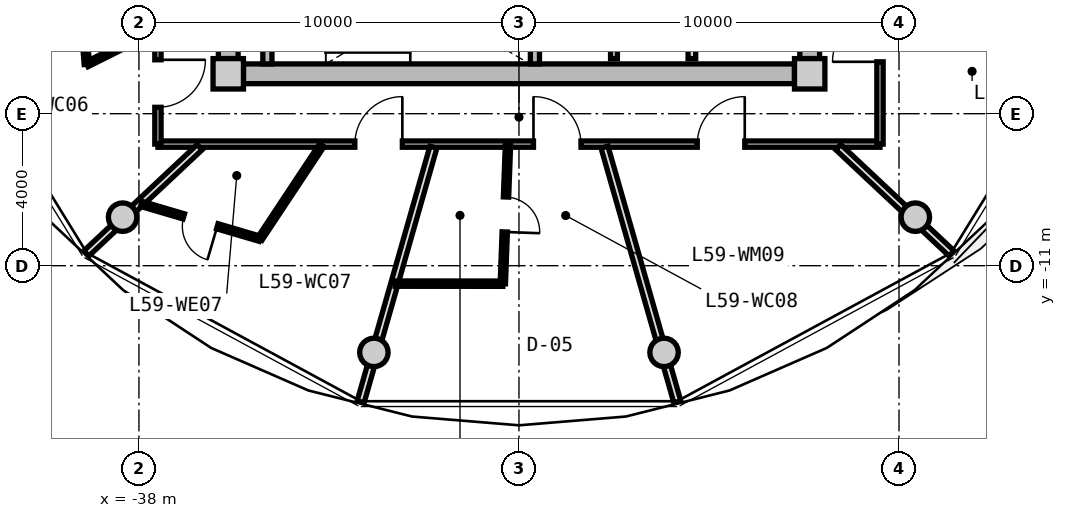
"""IFC4 building model, lengths in metres.
Left out: names, types, materials, properties, quantities, classifications, styles, units other than length and angle.
Written with IfcOpenShell. Run it as: python <this file> out.ifc"""

import sys

from ifc_helpers import new_model, si_unit, direction, frame, frame_2d, origin, origin_2d, place, context, subcontext, project, spatial, rectangle, circle, extrude, source, transform, mapped, element, fill, save


model = new_model("IFC4")
c1 = context("Model", 3, precision=1e-05, world=origin(), true_north=direction((0.0, 1.0)))
c2 = subcontext(c1, "Body", "Model", "MODEL_VIEW")
j1 = project(units=[si_unit("LENGTHUNIT", "METRE"), si_unit("PLANEANGLEUNIT", "RADIAN")], contexts=[c1])
p1 = place(None, origin())
s1 = spatial("IfcSite", under=j1, at=p1, CompositionType="ELEMENT")
p2 = place(p1, origin())
s2 = spatial("IfcBuilding", under=s1, at=p2, CompositionType="ELEMENT")
p3 = place(p2, frame((0.0, 0.0, 190.65)))
s3 = spatial("IfcBuildingStorey", under=s2, at=p3, CompositionType="ELEMENT", Elevation=190.65)
m1 = source(origin(), c2, "Body", "SweptSolid", [
    extrude(rectangle(XDim=0.8, YDim=0.8, at=origin_2d()), origin(), (0.0, 0.0, 1.0), 3.05),
])
for number, where, z_axis, x_axis in (
    (1, (-35.65, -5.95, 0.0), (0.0, 0.0, 1.0), (1.0, 0.0, 0.0)),
    (2, (-20.35, -5.95, 0.0), (0.0, 0.0, 1.0), (1.0, 0.0, 0.0)),
):
    element("IfcColumn", number, at=place(p3, frame(where, z_axis=z_axis, x_axis=x_axis)), inside=s3, PredefinedType="COLUMN", context=c2, shape_type="MappedRepresentation", body=[
        mapped(m1, transform((0.0, 0.0, 0.0), x_axis=(1.0, 0.0, 0.0), y_axis=(0.0, 1.0, 0.0), z_axis=(0.0, 0.0, 1.0), scale=1.0)),
    ])
m2 = source(origin(), c2, "Body", "SweptSolid", [
    extrude(rectangle(XDim=14.5, YDim=0.52, at=frame_2d((7.25, 0.0))), origin(), (0.0, 0.0, 1.0), 2.81),
])
p4 = place(p3, frame((-20.75, -5.95, 0.0), z_axis=(0.0, 0.0, 1.0), x_axis=(-1.0, 0.0, 0.0)))
e3 = element("IfcWall", 3, at=p4, inside=s3, PredefinedType="SHEAR", context=c2, shape_type="MappedRepresentation", body=[
    mapped(m2, transform((0.0, 0.0, 0.0), x_axis=(1.0, 0.0, 0.0), y_axis=(0.0, 1.0, 0.0), z_axis=(0.0, 0.0, 1.0), scale=1.0)),
])
m3 = source(origin(), c2, "Body", "SweptSolid", [
    extrude(rectangle(XDim=11.1, YDim=0.52, at=frame_2d((5.55, 0.0))), origin(), (0.0, 0.0, 1.0), 2.81),
])
p5 = place(p3, frame((-35.65, -5.55, 0.0), z_axis=(0.0, 0.0, 1.0), x_axis=(0.0, 1.0, 0.0)))
e4 = element("IfcWall", 4, at=p5, inside=s3, PredefinedType="SHEAR", context=c2, shape_type="MappedRepresentation", body=[
    mapped(m3, transform((0.0, 0.0, 0.0), x_axis=(1.0, 0.0, 0.0), y_axis=(0.0, 1.0, 0.0), z_axis=(0.0, 0.0, 1.0), scale=1.0)),
])
p6 = place(p5, frame((3.8, 0.0, 0.0)))
e5 = element("IfcOpeningElement", 5, at=p6, cuts=e4, PredefinedType="OPENING", context=c2, shape_type="SweptSolid", body=[
    extrude(rectangle(XDim=1.2, YDim=2.15, at=frame_2d((0.6, 1.075))), frame((0.0, 0.27, 0.0), z_axis=(0.0, -1.0, 0.0), x_axis=(1.0, 0.0, 0.0)), (0.0, 0.0, 1.0), 0.54),
])
p7 = place(p3, frame((-20.35, 5.55, 0.0), z_axis=(0.0, 0.0, 1.0), x_axis=(0.0, -1.0, 0.0)))
e6 = element("IfcWall", 6, at=p7, inside=s3, PredefinedType="SHEAR", context=c2, shape_type="MappedRepresentation", body=[
    mapped(m3, transform((0.0, 0.0, 0.0), x_axis=(1.0, 0.0, 0.0), y_axis=(0.0, 1.0, 0.0), z_axis=(0.0, 0.0, 1.0), scale=1.0)),
])
p8 = place(p7, frame((5.65, 0.0, 0.0)))
e7 = element("IfcOpeningElement", 7, at=p8, cuts=e6, PredefinedType="OPENING", context=c2, shape_type="SweptSolid", body=[
    extrude(rectangle(XDim=1.2, YDim=2.15, at=frame_2d((0.6, 1.075))), frame((0.0, 0.27, 0.0), z_axis=(0.0, -1.0, 0.0), x_axis=(1.0, 0.0, 0.0)), (0.0, 0.0, 1.0), 0.54),
])
p9 = place(p7, frame((9.3, 0.0, 0.0)))
e8 = element("IfcOpeningElement", 8, at=p9, cuts=e6, PredefinedType="OPENING", context=c2, shape_type="SweptSolid", body=[
    extrude(rectangle(XDim=1.0, YDim=2.1, at=frame_2d((0.5, 1.05))), frame((0.0, 0.27, 0.0), z_axis=(0.0, -1.0, 0.0), x_axis=(1.0, 0.0, 0.0)), (0.0, 0.0, 1.0), 0.54),
])
m4 = source(origin(), c2, "Body", "SweptSolid", [
    extrude(circle(Radius=0.375, at=origin_2d()), origin(), (0.0, 0.0, 1.0), 3.47),
])
for number, where, z_axis, x_axis in (
    (9, (-38.43, -9.723, -0.42), (0.0, 0.0, 1.0), (1.0, 0.0, 0.0)),
    (10, (-31.818, -13.281, -0.42), (0.0, 0.0, 1.0), (1.0, 0.0, 0.0)),
    (11, (-24.182, -13.281, -0.42), (0.0, 0.0, 1.0), (1.0, 0.0, 0.0)),
    (12, (-17.57, -9.723, -0.42), (0.0, 0.0, 1.0), (1.0, 0.0, 0.0)),
):
    element("IfcColumn", number, at=place(p3, frame(where, z_axis=z_axis, x_axis=x_axis)), inside=s3, PredefinedType="COLUMN", context=c2, shape_type="MappedRepresentation", body=[
        mapped(m4, transform((0.0, 0.0, 0.0), x_axis=(1.0, 0.0, 0.0), y_axis=(0.0, 1.0, 0.0), z_axis=(0.0, 0.0, 1.0), scale=1.0)),
    ])
m5 = source(origin(), c2, "Body", "SweptSolid", [
    extrude(rectangle(XDim=3.24, YDim=0.24, at=frame_2d((1.62, 0.0))), origin(), (0.0, 0.0, 1.0), 2.81),
])
for number, where, z_axis, x_axis in (
    (13, (-34.62, -5.69, 0.0), (0.0, 0.0, 1.0), (0.0, 1.0, 0.0)),
    (14, (-27.58, -5.69, 0.0), (0.0, 0.0, 1.0), (0.0, 1.0, 0.0)),
):
    element("IfcWall", number, at=place(p3, frame(where, z_axis=z_axis, x_axis=x_axis)), inside=s3, PredefinedType="PARTITIONING", context=c2, shape_type="MappedRepresentation", body=[
        mapped(m5, transform((0.0, 0.0, 0.0), x_axis=(1.0, 0.0, 0.0), y_axis=(0.0, 1.0, 0.0), z_axis=(0.0, 0.0, 1.0), scale=1.0)),
    ])
m6 = source(origin(), c2, "Body", "SweptSolid", [
    extrude(rectangle(XDim=3.8, YDim=0.2, at=frame_2d((1.9, 0.0))), origin(), (0.0, 0.0, 1.0), 2.795),
])
p10 = place(p3, frame((-23.45, -5.55, 0.0), z_axis=(0.0, 0.0, 1.0), x_axis=(0.0, 1.0, 0.0)))
e15 = element("IfcWall", 15, at=p10, inside=s3, PredefinedType="PARTITIONING", context=c2, shape_type="MappedRepresentation", body=[
    mapped(m6, transform((0.0, 0.0, 0.0), x_axis=(1.0, 0.0, 0.0), y_axis=(0.0, 1.0, 0.0), z_axis=(0.0, 0.0, 1.0), scale=1.0)),
])
m7 = source(origin(), c2, "Body", "SweptSolid", [
    extrude(rectangle(XDim=4.2, YDim=0.18, at=frame_2d((2.1, 0.0))), origin(), (0.0, 0.0, 1.0), 2.795),
])
p11 = place(p3, frame((-25.5, -5.55, 0.0), z_axis=(0.0, 0.0, 1.0), x_axis=(0.0, 1.0, 0.0)))
e16 = element("IfcWall", 16, at=p11, inside=s3, PredefinedType="PARTITIONING", context=c2, shape_type="MappedRepresentation", body=[
    mapped(m7, transform((0.0, 0.0, 0.0), x_axis=(1.0, 0.0, 0.0), y_axis=(0.0, 1.0, 0.0), z_axis=(0.0, 0.0, 1.0), scale=1.0)),
])
m8 = source(origin(), c2, "Body", "SweptSolid", [
    extrude(rectangle(XDim=19.0, YDim=0.165, at=frame_2d((9.5, 0.0))), origin(), (0.0, 0.0, 1.0), 2.795),
])
p12 = place(p3, frame((-18.5, -7.8, 0.0), z_axis=(0.0, 0.0, 1.0), x_axis=(-1.0, 0.0, 0.0)))
e17 = element("IfcWall", 17, at=p12, inside=s3, PredefinedType="PARTITIONING", context=c2, shape_type="MappedRepresentation", body=[
    mapped(m8, transform((0.0, 0.0, 0.0), x_axis=(1.0, 0.0, 0.0), y_axis=(0.0, 1.0, 0.0), z_axis=(0.0, 0.0, 1.0), scale=1.0)),
])
p13 = place(p12, frame((12.569, 0.0, 0.0)))
e18 = element("IfcOpeningElement", 18, at=p13, cuts=e17, PredefinedType="OPENING", context=c2, shape_type="SweptSolid", body=[
    extrude(rectangle(XDim=1.25, YDim=2.2, at=frame_2d((0.625, 1.1))), frame((0.0, 0.093, 0.0), z_axis=(0.0, -1.0, 0.0), x_axis=(1.0, 0.0, 0.0)), (0.0, 0.0, 1.0), 0.185),
])
p14 = place(p12, frame((7.868, 0.0, 0.0)))
e19 = element("IfcOpeningElement", 19, at=p14, cuts=e17, PredefinedType="OPENING", context=c2, shape_type="SweptSolid", body=[
    extrude(rectangle(XDim=1.25, YDim=2.2, at=frame_2d((0.625, 1.1))), frame((0.0, 0.093, 0.0), z_axis=(0.0, -1.0, 0.0), x_axis=(1.0, 0.0, 0.0)), (0.0, 0.0, 1.0), 0.185),
])
p15 = place(p12, frame((3.559, 0.0, 0.0)))
e20 = element("IfcOpeningElement", 20, at=p15, cuts=e17, PredefinedType="OPENING", context=c2, shape_type="SweptSolid", body=[
    extrude(rectangle(XDim=1.25, YDim=2.2, at=frame_2d((0.625, 1.1))), frame((0.0, 0.093, 0.0), z_axis=(0.0, -1.0, 0.0), x_axis=(1.0, 0.0, 0.0)), (0.0, 0.0, 1.0), 0.185),
])
m9 = source(origin(), c2, "Body", "SweptSolid", [
    extrude(rectangle(XDim=6.88, YDim=0.165, at=frame_2d((3.44, 0.0))), origin(), (0.0, 0.0, 1.0), 2.795),
])
p16 = place(p3, frame((-37.5, -7.8, 0.0), z_axis=(0.0, 0.0, 1.0), x_axis=(0.0, 1.0, 0.0)))
e21 = element("IfcWall", 21, at=p16, inside=s3, PredefinedType="PARTITIONING", context=c2, shape_type="MappedRepresentation", body=[
    mapped(m9, transform((0.0, 0.0, 0.0), x_axis=(1.0, 0.0, 0.0), y_axis=(0.0, 1.0, 0.0), z_axis=(0.0, 0.0, 1.0), scale=1.0)),
])
p17 = place(p16, frame((0.968, 0.0, 0.0)))
e22 = element("IfcOpeningElement", 22, at=p17, cuts=e21, PredefinedType="OPENING", context=c2, shape_type="SweptSolid", body=[
    extrude(rectangle(XDim=1.25, YDim=2.2, at=frame_2d((0.625, 1.1))), frame((0.0, 0.093, 0.0), z_axis=(0.0, -1.0, 0.0), x_axis=(1.0, 0.0, 0.0)), (0.0, 0.0, 1.0), 0.185),
])
p18 = place(p3, frame((-18.5, -0.92, 0.0), z_axis=(0.0, 0.0, 1.0), x_axis=(0.0, -1.0, 0.0)))
e23 = element("IfcWall", 23, at=p18, inside=s3, PredefinedType="PARTITIONING", context=c2, shape_type="MappedRepresentation", body=[
    mapped(m9, transform((0.0, 0.0, 0.0), x_axis=(1.0, 0.0, 0.0), y_axis=(0.0, 1.0, 0.0), z_axis=(0.0, 0.0, 1.0), scale=1.0)),
])
p19 = place(p18, frame((3.464, 0.0, 0.0)))
e24 = element("IfcOpeningElement", 24, at=p19, cuts=e23, PredefinedType="OPENING", context=c2, shape_type="SweptSolid", body=[
    extrude(rectangle(XDim=1.25, YDim=2.2, at=frame_2d((0.625, 1.1))), frame((0.0, 0.093, 0.0), z_axis=(0.0, -1.0, 0.0), x_axis=(1.0, 0.0, 0.0)), (0.0, 0.0, 1.0), 0.185),
])
m10 = source(origin(), c2, "Body", "SweptSolid", [
    extrude(rectangle(XDim=4.089, YDim=0.19, at=frame_2d((2.044, 0.0))), origin(), (0.0, 0.0, 1.0), 2.395),
])
p20 = place(p3, frame((-36.402, -7.88, 0.0), z_axis=(0.0, 0.0, 1.0), x_axis=(-0.729401273609, -0.684086092577, 0.0)))
e25 = element("IfcWall", 25, at=p20, inside=s3, PredefinedType="PARTITIONING", context=c2, shape_type="MappedRepresentation", body=[
    mapped(m10, transform((0.0, 0.0, 0.0), x_axis=(1.0, 0.0, 0.0), y_axis=(0.0, 1.0, 0.0), z_axis=(0.0, 0.0, 1.0), scale=1.0)),
])
m11 = source(origin(), c2, "Body", "SweptSolid", [
    extrude(rectangle(XDim=2.06, YDim=0.14, at=frame_2d((1.03, 0.0))), origin(), (0.0, 0.0, 1.0), 2.795),
])
p21 = place(p3, frame((-37.53, -4.778, 0.0), z_axis=(0.0, 0.0, 1.0), x_axis=(-0.893952568722, -0.448161583444, 0.0)))
e26 = element("IfcWall", 26, at=p21, inside=s3, PredefinedType="PARTITIONING", context=c2, shape_type="MappedRepresentation", body=[
    mapped(m11, transform((0.0, 0.0, 0.0), x_axis=(1.0, 0.0, 0.0), y_axis=(0.0, 1.0, 0.0), z_axis=(0.0, 0.0, 1.0), scale=1.0)),
])
m12 = source(origin(), c2, "Body", "SweptSolid", [
    extrude(rectangle(XDim=2.798, YDim=0.14, at=frame_2d((1.399, 0.0))), origin(), (0.0, 0.0, 1.0), 2.795),
])
p22 = place(p3, frame((-39.371, -5.701, 0.0), z_axis=(0.0, 0.0, 1.0), x_axis=(-0.077823984089, 0.996967114553, 0.0)))
e27 = element("IfcWall", 27, at=p22, inside=s3, PredefinedType="PARTITIONING", context=c2, shape_type="MappedRepresentation", body=[
    mapped(m12, transform((0.0, 0.0, 0.0), x_axis=(1.0, 0.0, 0.0), y_axis=(0.0, 1.0, 0.0), z_axis=(0.0, 0.0, 1.0), scale=1.0)),
])
p23 = place(p22, frame((0.939, 0.0, 0.0)))
e28 = element("IfcOpeningElement", 28, at=p23, cuts=e27, PredefinedType="OPENING", context=c2, shape_type="SweptSolid", body=[
    extrude(rectangle(XDim=0.92, YDim=2.1, at=frame_2d((0.46, 1.05))), frame((0.0, 0.08, 0.0), z_axis=(0.0, -1.0, 0.0), x_axis=(1.0, 0.0, 0.0)), (0.0, 0.0, 1.0), 0.16),
])
m13 = source(origin(), c2, "Body", "SweptSolid", [
    extrude(rectangle(XDim=6.974, YDim=0.19, at=frame_2d((3.487, 0.0))), origin(), (0.0, 0.0, 1.0), 2.395),
])
p24 = place(p3, frame((-30.251, -7.88, 0.0), z_axis=(0.0, 0.0, 1.0), x_axis=(-0.274707256801, -0.961527910703, 0.0)))
e29 = element("IfcWall", 29, at=p24, inside=s3, PredefinedType="PARTITIONING", context=c2, shape_type="MappedRepresentation", body=[
    mapped(m13, transform((0.0, 0.0, 0.0), x_axis=(1.0, 0.0, 0.0), y_axis=(0.0, 1.0, 0.0), z_axis=(0.0, 0.0, 1.0), scale=1.0)),
])
m14 = source(origin(), c2, "Body", "SweptSolid", [
    extrude(rectangle(XDim=2.953, YDim=0.14, at=frame_2d((1.476, 0.0))), origin(), (0.0, 0.0, 1.0), 2.795),
])
p25 = place(p3, frame((-33.188, -7.83, 0.0), z_axis=(0.0, 0.0, 1.0), x_axis=(-0.552427436518, -0.833560991999, 0.0)))
e30 = element("IfcWall", 30, at=p25, inside=s3, PredefinedType="PARTITIONING", context=c2, shape_type="MappedRepresentation", body=[
    mapped(m14, transform((0.0, 0.0, 0.0), x_axis=(1.0, 0.0, 0.0), y_axis=(0.0, 1.0, 0.0), z_axis=(0.0, 0.0, 1.0), scale=1.0)),
])
m15 = source(origin(), c2, "Body", "SweptSolid", [
    extrude(rectangle(XDim=3.252, YDim=0.14, at=frame_2d((1.626, 0.0))), origin(), (0.0, 0.0, 1.0), 2.795),
])
p26 = place(p3, frame((-34.82, -10.291, 0.0), z_axis=(0.0, 0.0, 1.0), x_axis=(-0.959294945864, 0.282406102695, 0.0)))
e31 = element("IfcWall", 31, at=p26, inside=s3, PredefinedType="PARTITIONING", context=c2, shape_type="MappedRepresentation", body=[
    mapped(m15, transform((0.0, 0.0, 0.0), x_axis=(1.0, 0.0, 0.0), y_axis=(0.0, 1.0, 0.0), z_axis=(0.0, 0.0, 1.0), scale=1.0)),
])
p27 = place(p26, frame((1.166, 0.0, 0.0)))
e32 = element("IfcOpeningElement", 32, at=p27, cuts=e31, PredefinedType="OPENING", context=c2, shape_type="SweptSolid", body=[
    extrude(rectangle(XDim=0.92, YDim=2.1, at=frame_2d((0.46, 1.05))), frame((0.0, 0.08, 0.0), z_axis=(0.0, -1.0, 0.0), x_axis=(1.0, 0.0, 0.0)), (0.0, 0.0, 1.0), 0.16),
])
p28 = place(p3, frame((-25.749, -7.88, 0.0), z_axis=(0.0, 0.0, 1.0), x_axis=(0.274707256801, -0.961527910703, 0.0)))
e33 = element("IfcWall", 33, at=p28, inside=s3, PredefinedType="PARTITIONING", context=c2, shape_type="MappedRepresentation", body=[
    mapped(m13, transform((0.0, 0.0, 0.0), x_axis=(1.0, 0.0, 0.0), y_axis=(0.0, 1.0, 0.0), z_axis=(0.0, 0.0, 1.0), scale=1.0)),
])
m16 = source(origin(), c2, "Body", "SweptSolid", [
    extrude(rectangle(XDim=3.646, YDim=0.14, at=frame_2d((1.823, 0.0))), origin(), (0.0, 0.0, 1.0), 2.795),
])
p29 = place(p3, frame((-28.29, -7.83, 0.0), z_axis=(0.0, 0.0, 1.0), x_axis=(-0.036962128131, -0.99931666707, 0.0)))
e34 = element("IfcWall", 34, at=p29, inside=s3, PredefinedType="PARTITIONING", context=c2, shape_type="MappedRepresentation", body=[
    mapped(m16, transform((0.0, 0.0, 0.0), x_axis=(1.0, 0.0, 0.0), y_axis=(0.0, 1.0, 0.0), z_axis=(0.0, 0.0, 1.0), scale=1.0)),
])
p30 = place(p29, frame((1.363, 0.0, 0.0)))
e35 = element("IfcOpeningElement", 35, at=p30, cuts=e34, PredefinedType="OPENING", context=c2, shape_type="SweptSolid", body=[
    extrude(rectangle(XDim=0.92, YDim=2.1, at=frame_2d((0.46, 1.05))), frame((0.0, 0.08, 0.0), z_axis=(0.0, -1.0, 0.0), x_axis=(1.0, 0.0, 0.0)), (0.0, 0.0, 1.0), 0.16),
])
m17 = source(origin(), c2, "Body", "SweptSolid", [
    extrude(rectangle(XDim=2.835, YDim=0.14, at=frame_2d((1.417, 0.0))), origin(), (0.0, 0.0, 1.0), 2.795),
])
p31 = place(p3, frame((-28.425, -11.474, 0.0), z_axis=(0.0, 0.0, 1.0), x_axis=(-0.999999699589, 0.000775126802, 0.0)))
e36 = element("IfcWall", 36, at=p31, inside=s3, PredefinedType="PARTITIONING", context=c2, shape_type="MappedRepresentation", body=[
    mapped(m17, transform((0.0, 0.0, 0.0), x_axis=(1.0, 0.0, 0.0), y_axis=(0.0, 1.0, 0.0), z_axis=(0.0, 0.0, 1.0), scale=1.0)),
])
p32 = place(p3, frame((-19.598, -7.88, 0.0), z_axis=(0.0, 0.0, 1.0), x_axis=(0.729401273609, -0.684086092577, 0.0)))
e37 = element("IfcWall", 37, at=p32, inside=s3, PredefinedType="PARTITIONING", context=c2, shape_type="MappedRepresentation", body=[
    mapped(m10, transform((0.0, 0.0, 0.0), x_axis=(1.0, 0.0, 0.0), y_axis=(0.0, 1.0, 0.0), z_axis=(0.0, 0.0, 1.0), scale=1.0)),
])
m18 = source(origin(), c2, "Body", "SweptSolid", [
    extrude(rectangle(XDim=1.25, YDim=2.2, at=frame_2d((0.625, 1.1))), frame((0.0, 0.025, 0.0), z_axis=(0.0, -1.0, 0.0), x_axis=(1.0, 0.0, 0.0)), (0.0, 0.0, 1.0), 0.05),
])
p33 = place(p17, frame((1.25, 0.0, 0.0), z_axis=(0.0, 0.0, 1.0), x_axis=(-1.0, 0.0, 0.0)))
e38 = element("IfcDoor", 38, at=p33, inside=s3, OperationType="SINGLE_SWING_LEFT", PredefinedType="DOOR", context=c2, shape_type="MappedRepresentation", body=[
    mapped(m18, transform((0.0, 0.0, 0.0), x_axis=(1.0, 0.0, 0.0), y_axis=(0.0, 1.0, 0.0), z_axis=(0.0, 0.0, 1.0), scale=1.0)),
])
fill(e22, e38)
p34 = place(p13, frame((1.25, 0.0, 0.0), z_axis=(0.0, 0.0, 1.0), x_axis=(-1.0, 0.0, 0.0)))
e39 = element("IfcDoor", 39, at=p34, inside=s3, OperationType="SINGLE_SWING_RIGHT", PredefinedType="DOOR", context=c2, shape_type="MappedRepresentation", body=[
    mapped(m18, transform((0.0, 0.0, 0.0), x_axis=(1.0, 0.0, 0.0), y_axis=(0.0, 1.0, 0.0), z_axis=(0.0, 0.0, 1.0), scale=1.0)),
])
fill(e18, e39)
m19 = source(origin(), c2, "Body", "SweptSolid", [
    extrude(rectangle(XDim=0.92, YDim=2.1, at=frame_2d((0.46, 1.05))), frame((0.0, 0.025, 0.0), z_axis=(0.0, -1.0, 0.0), x_axis=(1.0, 0.0, 0.0)), (0.0, 0.0, 1.0), 0.05),
])
p35 = place(p27, origin())
e40 = element("IfcDoor", 40, at=p35, inside=s3, OperationType="SINGLE_SWING_LEFT", PredefinedType="DOOR", context=c2, shape_type="MappedRepresentation", body=[
    mapped(m19, transform((0.0, 0.0, 0.0), x_axis=(1.0, 0.0, 0.0), y_axis=(0.0, 1.0, 0.0), z_axis=(0.0, 0.0, 1.0), scale=1.0)),
])
fill(e32, e40)
p36 = place(p14, frame((1.25, 0.0, 0.0), z_axis=(0.0, 0.0, 1.0), x_axis=(-1.0, 0.0, 0.0)))
e41 = element("IfcDoor", 41, at=p36, inside=s3, OperationType="SINGLE_SWING_LEFT", PredefinedType="DOOR", context=c2, shape_type="MappedRepresentation", body=[
    mapped(m18, transform((0.0, 0.0, 0.0), x_axis=(1.0, 0.0, 0.0), y_axis=(0.0, 1.0, 0.0), z_axis=(0.0, 0.0, 1.0), scale=1.0)),
])
fill(e19, e41)
p37 = place(p30, origin())
e42 = element("IfcDoor", 42, at=p37, inside=s3, OperationType="SINGLE_SWING_RIGHT", PredefinedType="DOOR", context=c2, shape_type="MappedRepresentation", body=[
    mapped(m19, transform((0.0, 0.0, 0.0), x_axis=(1.0, 0.0, 0.0), y_axis=(0.0, 1.0, 0.0), z_axis=(0.0, 0.0, 1.0), scale=1.0)),
])
fill(e35, e42)
p38 = place(p15, frame((1.25, 0.0, 0.0), z_axis=(0.0, 0.0, 1.0), x_axis=(-1.0, 0.0, 0.0)))
e43 = element("IfcDoor", 43, at=p38, inside=s3, OperationType="SINGLE_SWING_RIGHT", PredefinedType="DOOR", context=c2, shape_type="MappedRepresentation", body=[
    mapped(m18, transform((0.0, 0.0, 0.0), x_axis=(1.0, 0.0, 0.0), y_axis=(0.0, 1.0, 0.0), z_axis=(0.0, 0.0, 1.0), scale=1.0)),
])
fill(e20, e43)
p39 = place(p19, frame((1.25, 0.0, 0.0), z_axis=(0.0, 0.0, 1.0), x_axis=(-1.0, 0.0, 0.0)))
e44 = element("IfcDoor", 44, at=p39, inside=s3, OperationType="SINGLE_SWING_LEFT", PredefinedType="DOOR", context=c2, shape_type="MappedRepresentation", body=[
    mapped(m18, transform((0.0, 0.0, 0.0), x_axis=(1.0, 0.0, 0.0), y_axis=(0.0, 1.0, 0.0), z_axis=(0.0, 0.0, 1.0), scale=1.0)),
])
fill(e24, e44)
save(model, sys.argv[1])
